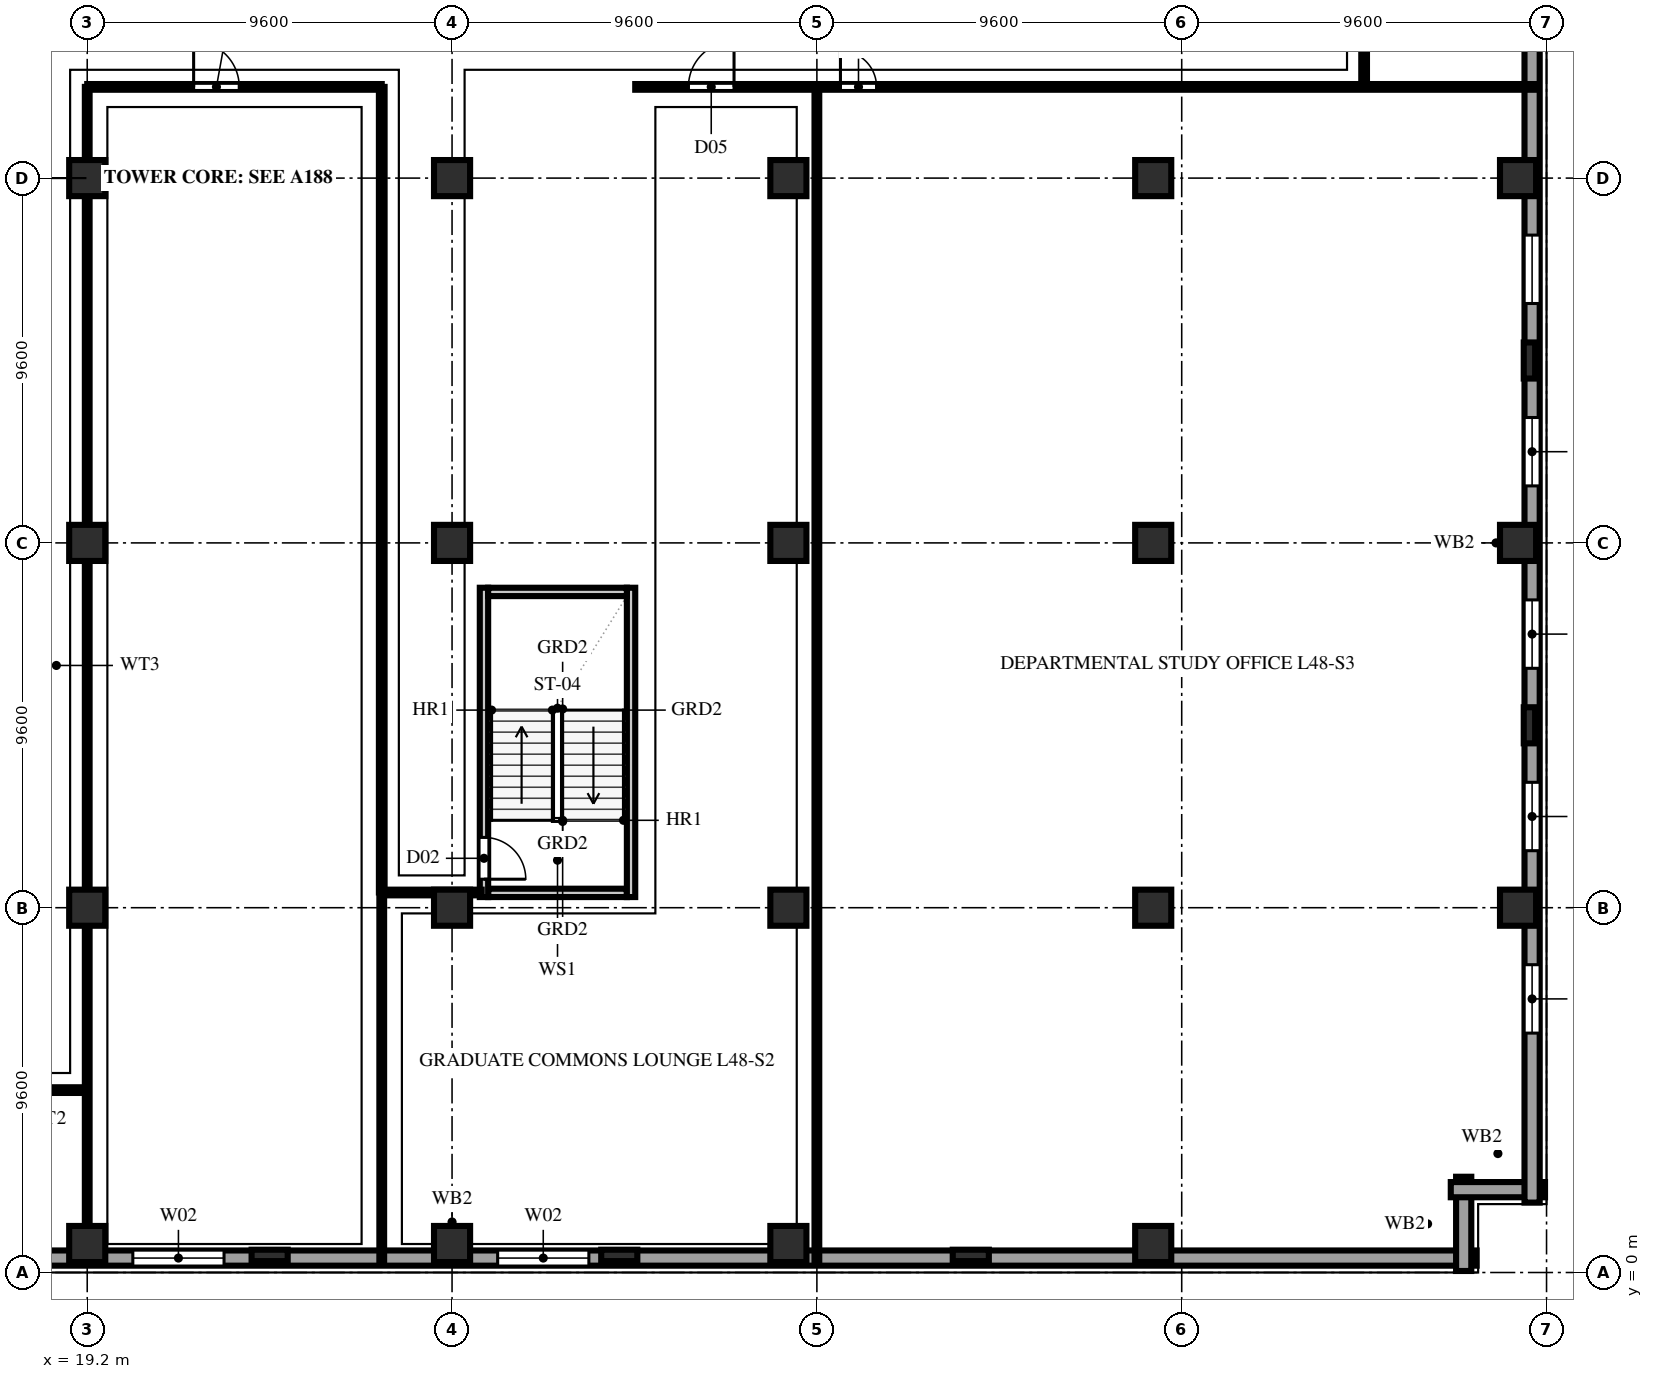
"""IFC4 building model, lengths in metres.
Left out: names, types, materials, properties, quantities, classifications, styles, units other than length and angle.
Written with IfcOpenShell. Run it as: python <this file> out.ifc"""

import sys

from ifc_helpers import new_model, si_unit, direction, frame, frame_2d, origin, origin_2d, place, context, subcontext, project, spatial, rectangle, extrude, element, fill, save


model = new_model("IFC4")
c1 = context("Model", 3, precision=1e-05, world=origin(), true_north=direction((0.0, 1.0)))
c2 = subcontext(c1, "Body", "Model", "MODEL_VIEW")
j1 = project(units=[si_unit("LENGTHUNIT", "METRE"), si_unit("PLANEANGLEUNIT", "RADIAN")], contexts=[c1])
p1 = place(None, origin())
s1 = spatial("IfcSite", under=j1, at=p1, CompositionType="ELEMENT")
p2 = place(p1, origin())
s2 = spatial("IfcBuilding", under=s1, at=p2, CompositionType="ELEMENT")
p3 = place(p2, frame((0.0, 0.0, 190.2)))
s3 = spatial("IfcBuildingStorey", under=s2, at=p3, CompositionType="ELEMENT", Elevation=190.2)
for number, where, z_axis, x_axis in (
    (1, (19.2, 0.75, 0.0), (0.0, 0.0, 1.0), (1.0, 0.0, 0.0)),
    (2, (19.2, 9.6, 0.0), (0.0, 0.0, 1.0), (1.0, 0.0, 0.0)),
    (3, (19.2, 19.2, 0.0), (0.0, 0.0, 1.0), (1.0, 0.0, 0.0)),
    (4, (19.2, 28.8, 0.0), (0.0, 0.0, 1.0), (1.0, 0.0, 0.0)),
    (5, (28.8, 0.75, 0.0), (0.0, 0.0, 1.0), (1.0, 0.0, 0.0)),
    (6, (28.8, 9.6, 0.0), (0.0, 0.0, 1.0), (1.0, 0.0, 0.0)),
    (7, (28.8, 19.2, 0.0), (0.0, 0.0, 1.0), (1.0, 0.0, 0.0)),
    (8, (28.8, 28.8, 0.0), (0.0, 0.0, 1.0), (1.0, 0.0, 0.0)),
    (9, (37.65, 0.75, 0.0), (0.0, 0.0, 1.0), (1.0, 0.0, 0.0)),
    (10, (37.65, 9.6, 0.0), (0.0, 0.0, 1.0), (1.0, 0.0, 0.0)),
    (11, (37.65, 19.2, 0.0), (0.0, 0.0, 1.0), (1.0, 0.0, 0.0)),
    (12, (37.65, 28.8, 0.0), (0.0, 0.0, 1.0), (1.0, 0.0, 0.0)),
    (13, (47.25, 0.75, 0.0), (0.0, 0.0, 1.0), (1.0, 0.0, 0.0)),
    (14, (47.25, 9.6, 0.0), (0.0, 0.0, 1.0), (1.0, 0.0, 0.0)),
    (15, (47.25, 19.2, 0.0), (0.0, 0.0, 1.0), (1.0, 0.0, 0.0)),
    (16, (47.25, 28.8, 0.0), (0.0, 0.0, 1.0), (1.0, 0.0, 0.0)),
    (17, (56.85, 9.6, 0.0), (0.0, 0.0, 1.0), (1.0, 0.0, 0.0)),
    (18, (56.85, 19.2, 0.0), (0.0, 0.0, 1.0), (1.0, 0.0, 0.0)),
    (19, (56.85, 28.8, 0.0), (0.0, 0.0, 1.0), (1.0, 0.0, 0.0)),
):
    element("IfcColumn", number, at=place(p3, frame(where, z_axis=z_axis, x_axis=x_axis)), inside=s3, PredefinedType="COLUMN", context=c2, shape_type="SweptSolid", body=[
        extrude(rectangle(XDim=0.95, YDim=0.95, at=origin_2d()), origin(), (0.0, 0.0, 1.0), 3.8),
    ])
for number, where, z_axis, x_axis in (
    (20, (24.0, 0.45, 0.0), (0.0, 0.0, 1.0), (1.0, 0.0, 0.0)),
    (21, (33.2, 0.45, 0.0), (0.0, 0.0, 1.0), (1.0, 0.0, 0.0)),
    (22, (42.45, 0.45, 0.0), (0.0, 0.0, 1.0), (1.0, 0.0, 0.0)),
    (23, (57.15, 14.4, 0.0), (0.0, 0.0, 1.0), (0.0, 1.0, 0.0)),
    (24, (57.15, 24.0, 0.0), (0.0, 0.0, 1.0), (0.0, 1.0, 0.0)),
):
    element("IfcColumn", number, at=place(p3, frame(where, z_axis=z_axis, x_axis=x_axis)), inside=s3, PredefinedType="PILASTER", context=c2, shape_type="SweptSolid", body=[
        extrude(rectangle(XDim=0.95, YDim=0.3, at=origin_2d()), origin(), (0.0, 0.0, 1.0), 3.8),
    ])
p4 = place(p3, frame((1.84, 0.38, 0.0), z_axis=(0.0, 0.0, 1.0), x_axis=(1.0, 0.0, 0.0)))
e25 = element("IfcWall", 25, at=p4, inside=s3, PredefinedType="SOLIDWALL", context=c2, shape_type="SweptSolid", body=[
    extrude(rectangle(XDim=53.92, YDim=0.4, at=frame_2d((26.96, 0.0))), origin(), (0.0, 0.0, 1.0), 3.48),
])
p5 = place(p4, frame((4.16, 0.0, 0.85)))
e26 = element("IfcOpeningElement", 26, at=p5, cuts=e25, PredefinedType="OPENING", context=c2, shape_type="SweptSolid", body=[
    extrude(rectangle(XDim=2.4, YDim=1.85, at=frame_2d((1.2, 0.925))), frame((0.0, 0.212, 0.0), z_axis=(0.0, -1.0, 0.0), x_axis=(1.0, 0.0, 0.0)), (0.0, 0.0, 1.0), 0.424),
])
p6 = place(p4, frame((8.96, 0.0, 0.85)))
e27 = element("IfcOpeningElement", 27, at=p6, cuts=e25, PredefinedType="OPENING", context=c2, shape_type="SweptSolid", body=[
    extrude(rectangle(XDim=2.4, YDim=1.85, at=frame_2d((1.2, 0.925))), frame((0.0, 0.212, 0.0), z_axis=(0.0, -1.0, 0.0), x_axis=(1.0, 0.0, 0.0)), (0.0, 0.0, 1.0), 0.424),
])
p7 = place(p4, frame((18.56, 0.0, 0.85)))
e28 = element("IfcOpeningElement", 28, at=p7, cuts=e25, PredefinedType="OPENING", context=c2, shape_type="SweptSolid", body=[
    extrude(rectangle(XDim=2.4, YDim=1.85, at=frame_2d((1.2, 0.925))), frame((0.0, 0.212, 0.0), z_axis=(0.0, -1.0, 0.0), x_axis=(1.0, 0.0, 0.0)), (0.0, 0.0, 1.0), 0.424),
])
p8 = place(p4, frame((28.16, 0.0, 0.85)))
e29 = element("IfcOpeningElement", 29, at=p8, cuts=e25, PredefinedType="OPENING", context=c2, shape_type="SweptSolid", body=[
    extrude(rectangle(XDim=2.4, YDim=1.85, at=frame_2d((1.2, 0.925))), frame((0.0, 0.212, 0.0), z_axis=(0.0, -1.0, 0.0), x_axis=(1.0, 0.0, 0.0)), (0.0, 0.0, 1.0), 0.424),
])
for number, where, z_axis, x_axis in (
    (30, (55.42, 0.04, 0.0), (0.0, 0.0, 1.0), (0.0, 1.0, 0.0)),
    (31, (55.08, 2.18, 0.0), (0.0, 0.0, 1.0), (1.0, 0.0, 0.0)),
):
    element("IfcWall", number, at=place(p3, frame(where, z_axis=z_axis, x_axis=x_axis)), inside=s3, PredefinedType="SOLIDWALL", context=c2, shape_type="SweptSolid", body=[
        extrude(rectangle(XDim=2.48, YDim=0.4, at=frame_2d((1.24, 0.0))), origin(), (0.0, 0.0, 1.0), 3.48),
    ])
p9 = place(p3, frame((57.22, 1.84, 0.0), z_axis=(0.0, 0.0, 1.0), x_axis=(0.0, 1.0, 0.0)))
e32 = element("IfcWall", 32, at=p9, inside=s3, PredefinedType="SOLIDWALL", context=c2, shape_type="SweptSolid", body=[
    extrude(rectangle(XDim=34.72, YDim=0.4, at=frame_2d((17.36, 0.0))), origin(), (0.0, 0.0, 1.0), 3.48),
])
p10 = place(p9, frame((4.46, 0.0, 0.85)))
e33 = element("IfcOpeningElement", 33, at=p10, cuts=e32, PredefinedType="OPENING", context=c2, shape_type="SweptSolid", body=[
    extrude(rectangle(XDim=1.8, YDim=1.85, at=frame_2d((0.9, 0.925))), frame((0.0, 0.212, 0.0), z_axis=(0.0, -1.0, 0.0), x_axis=(1.0, 0.0, 0.0)), (0.0, 0.0, 1.0), 0.424),
])
p11 = place(p9, frame((9.26, 0.0, 0.85)))
e34 = element("IfcOpeningElement", 34, at=p11, cuts=e32, PredefinedType="OPENING", context=c2, shape_type="SweptSolid", body=[
    extrude(rectangle(XDim=1.8, YDim=1.85, at=frame_2d((0.9, 0.925))), frame((0.0, 0.212, 0.0), z_axis=(0.0, -1.0, 0.0), x_axis=(1.0, 0.0, 0.0)), (0.0, 0.0, 1.0), 0.424),
])
p12 = place(p9, frame((14.06, 0.0, 0.85)))
e35 = element("IfcOpeningElement", 35, at=p12, cuts=e32, PredefinedType="OPENING", context=c2, shape_type="SweptSolid", body=[
    extrude(rectangle(XDim=1.8, YDim=1.85, at=frame_2d((0.9, 0.925))), frame((0.0, 0.212, 0.0), z_axis=(0.0, -1.0, 0.0), x_axis=(1.0, 0.0, 0.0)), (0.0, 0.0, 1.0), 0.424),
])
p13 = place(p9, frame((18.86, 0.0, 0.85)))
e36 = element("IfcOpeningElement", 36, at=p13, cuts=e32, PredefinedType="OPENING", context=c2, shape_type="SweptSolid", body=[
    extrude(rectangle(XDim=1.8, YDim=1.85, at=frame_2d((0.9, 0.925))), frame((0.0, 0.212, 0.0), z_axis=(0.0, -1.0, 0.0), x_axis=(1.0, 0.0, 0.0)), (0.0, 0.0, 1.0), 0.424),
])
p14 = place(p9, frame((23.66, 0.0, 0.85)))
e37 = element("IfcOpeningElement", 37, at=p14, cuts=e32, PredefinedType="OPENING", context=c2, shape_type="SweptSolid", body=[
    extrude(rectangle(XDim=1.8, YDim=1.85, at=frame_2d((0.9, 0.925))), frame((0.0, 0.212, 0.0), z_axis=(0.0, -1.0, 0.0), x_axis=(1.0, 0.0, 0.0)), (0.0, 0.0, 1.0), 0.424),
])
p15 = place(p3, frame((29.75, 9.99, 0.0), z_axis=(0.0, 0.0, 1.0), x_axis=(1.0, 0.0, 0.0)))
e38 = element("IfcWall", 38, at=p15, inside=s3, PredefinedType="SOLIDWALL", context=c2, shape_type="SweptSolid", body=[
    extrude(rectangle(XDim=3.65, YDim=0.22, at=frame_2d((1.825, 0.0))), origin(), (0.0, 0.0, 1.0), 3.48),
])
p16 = place(p3, frame((29.64, 9.88, 0.0), z_axis=(0.0, 0.0, 1.0), x_axis=(0.0, 1.0, 0.0)))
e39 = element("IfcWall", 39, at=p16, inside=s3, PredefinedType="SOLIDWALL", context=c2, shape_type="SweptSolid", body=[
    extrude(rectangle(XDim=8.14, YDim=0.22, at=frame_2d((4.07, 0.0))), origin(), (0.0, 0.0, 1.0), 3.48),
])
p17 = place(p16, frame((0.47, 0.0, 0.0)))
e40 = element("IfcOpeningElement", 40, at=p17, cuts=e39, PredefinedType="OPENING", context=c2, shape_type="SweptSolid", body=[
    extrude(rectangle(XDim=1.1, YDim=2.2, at=frame_2d((0.55, 1.1))), frame((0.0, 0.122, 0.0), z_axis=(0.0, -1.0, 0.0), x_axis=(1.0, 0.0, 0.0)), (0.0, 0.0, 1.0), 0.244),
])
p18 = place(p3, frame((33.51, 9.88, 0.0), z_axis=(0.0, 0.0, 1.0), x_axis=(0.0, 1.0, 0.0)))
e41 = element("IfcWall", 41, at=p18, inside=s3, PredefinedType="SOLIDWALL", context=c2, shape_type="SweptSolid", body=[
    extrude(rectangle(XDim=8.14, YDim=0.22, at=frame_2d((4.07, 0.0))), origin(), (0.0, 0.0, 1.0), 3.48),
])
p19 = place(p3, frame((29.75, 17.91, 0.0), z_axis=(0.0, 0.0, 1.0), x_axis=(1.0, 0.0, 0.0)))
e42 = element("IfcWall", 42, at=p19, inside=s3, PredefinedType="SOLIDWALL", context=c2, shape_type="SweptSolid", body=[
    extrude(rectangle(XDim=3.65, YDim=0.22, at=frame_2d((1.825, 0.0))), origin(), (0.0, 0.0, 1.0), 3.48),
])
p20 = place(p3, frame((17.05, 4.8, 0.0), z_axis=(0.0, 0.0, 1.0), x_axis=(1.0, 0.0, 0.0)))
e43 = element("IfcWall", 43, at=p20, inside=s3, PredefinedType="PARTITIONING", context=c2, shape_type="SweptSolid", body=[
    extrude(rectangle(XDim=2.15, YDim=0.15, at=frame_2d((1.075, 0.0))), origin(), (0.0, 0.0, 1.0), 3.48),
])
p21 = place(p3, frame((52.8, 31.2, 0.0), z_axis=(0.0, 0.0, 1.0), x_axis=(0.0, 1.0, 0.0)))
e44 = element("IfcWall", 44, at=p21, inside=s3, PredefinedType="PARTITIONING", context=c2, shape_type="SweptSolid", body=[
    extrude(rectangle(XDim=2.1, YDim=0.15, at=frame_2d((1.05, 0.0))), origin(), (0.0, 0.0, 1.0), 3.48),
])
p22 = place(p3, frame((19.2, 0.22, 0.0), z_axis=(0.0, 0.0, 1.0), x_axis=(0.0, 1.0, 0.0)))
e45 = element("IfcWall", 45, at=p22, inside=s3, PredefinedType="PARTITIONING", context=c2, shape_type="SweptSolid", body=[
    extrude(rectangle(XDim=0.53, YDim=0.125, at=frame_2d((0.265, 0.0))), origin(), (0.0, 0.0, 1.0), 3.48),
])
p23 = place(p3, frame((19.2, 0.75, 0.0), z_axis=(0.0, 0.0, 1.0), x_axis=(0.0, 1.0, 0.0)))
e46 = element("IfcWall", 46, at=p23, inside=s3, PredefinedType="PARTITIONING", context=c2, shape_type="SweptSolid", body=[
    extrude(rectangle(XDim=30.45, YDim=0.125, at=frame_2d((15.225, 0.0))), origin(), (0.0, 0.0, 1.0), 2.863),
])
p24 = place(p3, frame((19.2, 31.2, 0.0), z_axis=(0.0, 0.0, 1.0), x_axis=(1.0, 0.0, 0.0)))
e47 = element("IfcWall", 47, at=p24, inside=s3, PredefinedType="PARTITIONING", context=c2, shape_type="SweptSolid", body=[
    extrude(rectangle(XDim=7.75, YDim=0.15, at=frame_2d((3.875, 0.0))), origin(), (0.0, 0.0, 1.0), 3.48),
])
p25 = place(p24, frame((2.8, 0.0, 0.0)))
e48 = element("IfcOpeningElement", 48, at=p25, cuts=e47, PredefinedType="OPENING", context=c2, shape_type="SweptSolid", body=[
    extrude(rectangle(XDim=1.2, YDim=2.2, at=frame_2d((0.6, 1.1))), frame((0.0, 0.087, 0.0), z_axis=(0.0, -1.0, 0.0), x_axis=(1.0, 0.0, 0.0)), (0.0, 0.0, 1.0), 0.174),
])
p26 = place(p3, frame((26.95, 0.22, 0.0), z_axis=(0.0, 0.0, 1.0), x_axis=(0.0, 1.0, 0.0)))
e49 = element("IfcWall", 49, at=p26, inside=s3, PredefinedType="PARTITIONING", context=c2, shape_type="SweptSolid", body=[
    extrude(rectangle(XDim=9.78, YDim=0.125, at=frame_2d((4.89, 0.0))), origin(), (0.0, 0.0, 1.0), 3.48),
])
p27 = place(p3, frame((26.95, 10.0, 0.0), z_axis=(0.0, 0.0, 1.0), x_axis=(0.0, 1.0, 0.0)))
e50 = element("IfcWall", 50, at=p27, inside=s3, PredefinedType="PARTITIONING", context=c2, shape_type="SweptSolid", body=[
    extrude(rectangle(XDim=21.2, YDim=0.15, at=frame_2d((10.6, 0.0))), origin(), (0.0, 0.0, 1.0), 3.48),
])
p28 = place(p3, frame((26.95, 10.0, 0.0), z_axis=(0.0, 0.0, 1.0), x_axis=(1.0, 0.0, 0.0)))
e51 = element("IfcWall", 51, at=p28, inside=s3, PredefinedType="PARTITIONING", context=c2, shape_type="SweptSolid", body=[
    extrude(rectangle(XDim=2.63, YDim=0.15, at=frame_2d((1.315, 0.0))), origin(), (0.0, 0.0, 1.0), 3.48),
])
p29 = place(p3, frame((38.4, 0.22, 0.0), z_axis=(0.0, 0.0, 1.0), x_axis=(0.0, 1.0, 0.0)))
e52 = element("IfcWall", 52, at=p29, inside=s3, PredefinedType="PARTITIONING", context=c2, shape_type="SweptSolid", body=[
    extrude(rectangle(XDim=30.98, YDim=0.125, at=frame_2d((15.49, 0.0))), origin(), (0.0, 0.0, 1.0), 3.48),
])
p30 = place(p3, frame((33.62, 31.2, 0.0), z_axis=(0.0, 0.0, 1.0), x_axis=(1.0, 0.0, 0.0)))
e53 = element("IfcWall", 53, at=p30, inside=s3, PredefinedType="PARTITIONING", context=c2, shape_type="SweptSolid", body=[
    extrude(rectangle(XDim=23.76, YDim=0.15, at=frame_2d((11.88, 0.0))), origin(), (0.0, 0.0, 1.0), 3.48),
])
p31 = place(p30, frame((1.4, 0.0, 0.0)))
e54 = element("IfcOpeningElement", 54, at=p31, cuts=e53, PredefinedType="OPENING", context=c2, shape_type="SweptSolid", body=[
    extrude(rectangle(XDim=1.2, YDim=2.2, at=frame_2d((0.6, 1.1))), frame((0.0, 0.087, 0.0), z_axis=(0.0, -1.0, 0.0), x_axis=(1.0, 0.0, 0.0)), (0.0, 0.0, 1.0), 0.174),
])
p32 = place(p30, frame((5.4, 0.0, 0.0)))
e55 = element("IfcOpeningElement", 55, at=p32, cuts=e53, PredefinedType="OPENING", context=c2, shape_type="SweptSolid", body=[
    extrude(rectangle(XDim=0.95, YDim=2.15, at=frame_2d((0.475, 1.075))), frame((0.0, 0.087, 0.0), z_axis=(0.0, -1.0, 0.0), x_axis=(1.0, 0.0, 0.0)), (0.0, 0.0, 1.0), 0.174),
])
p33 = place(p7, origin())
e56 = element("IfcWindow", 56, at=p33, inside=s3, PartitioningType="TRIPLE_PANEL_VERTICAL", PredefinedType="WINDOW", context=c2, shape_type="SweptSolid", body=[
    extrude(rectangle(XDim=2.4, YDim=1.85, at=frame_2d((1.2, 0.925))), frame((0.0, 0.11, 0.0), z_axis=(0.0, -1.0, 0.0), x_axis=(1.0, 0.0, 0.0)), (0.0, 0.0, 1.0), 0.06),
])
fill(e28, e56)
p34 = place(p8, origin())
e57 = element("IfcWindow", 57, at=p34, inside=s3, PartitioningType="TRIPLE_PANEL_VERTICAL", PredefinedType="WINDOW", context=c2, shape_type="SweptSolid", body=[
    extrude(rectangle(XDim=2.4, YDim=1.85, at=frame_2d((1.2, 0.925))), frame((0.0, 0.11, 0.0), z_axis=(0.0, -1.0, 0.0), x_axis=(1.0, 0.0, 0.0)), (0.0, 0.0, 1.0), 0.06),
])
fill(e29, e57)
p35 = place(p10, origin())
e58 = element("IfcWindow", 58, at=p35, inside=s3, PartitioningType="DOUBLE_PANEL_VERTICAL", PredefinedType="WINDOW", context=c2, shape_type="SweptSolid", body=[
    extrude(rectangle(XDim=1.8, YDim=1.85, at=frame_2d((0.9, 0.925))), frame((0.0, 0.11, 0.0), z_axis=(0.0, -1.0, 0.0), x_axis=(1.0, 0.0, 0.0)), (0.0, 0.0, 1.0), 0.06),
])
fill(e33, e58)
p36 = place(p11, origin())
e59 = element("IfcWindow", 59, at=p36, inside=s3, PartitioningType="DOUBLE_PANEL_VERTICAL", PredefinedType="WINDOW", context=c2, shape_type="SweptSolid", body=[
    extrude(rectangle(XDim=1.8, YDim=1.85, at=frame_2d((0.9, 0.925))), frame((0.0, 0.11, 0.0), z_axis=(0.0, -1.0, 0.0), x_axis=(1.0, 0.0, 0.0)), (0.0, 0.0, 1.0), 0.06),
])
fill(e34, e59)
p37 = place(p12, origin())
e60 = element("IfcWindow", 60, at=p37, inside=s3, PartitioningType="DOUBLE_PANEL_VERTICAL", PredefinedType="WINDOW", context=c2, shape_type="SweptSolid", body=[
    extrude(rectangle(XDim=1.8, YDim=1.85, at=frame_2d((0.9, 0.925))), frame((0.0, 0.11, 0.0), z_axis=(0.0, -1.0, 0.0), x_axis=(1.0, 0.0, 0.0)), (0.0, 0.0, 1.0), 0.06),
])
fill(e35, e60)
p38 = place(p13, origin())
e61 = element("IfcWindow", 61, at=p38, inside=s3, PartitioningType="DOUBLE_PANEL_VERTICAL", PredefinedType="WINDOW", context=c2, shape_type="SweptSolid", body=[
    extrude(rectangle(XDim=1.8, YDim=1.85, at=frame_2d((0.9, 0.925))), frame((0.0, 0.11, 0.0), z_axis=(0.0, -1.0, 0.0), x_axis=(1.0, 0.0, 0.0)), (0.0, 0.0, 1.0), 0.06),
])
fill(e36, e61)
p39 = place(p14, origin())
e62 = element("IfcWindow", 62, at=p39, inside=s3, PartitioningType="DOUBLE_PANEL_VERTICAL", PredefinedType="WINDOW", context=c2, shape_type="SweptSolid", body=[
    extrude(rectangle(XDim=1.8, YDim=1.85, at=frame_2d((0.9, 0.925))), frame((0.0, 0.11, 0.0), z_axis=(0.0, -1.0, 0.0), x_axis=(1.0, 0.0, 0.0)), (0.0, 0.0, 1.0), 0.06),
])
fill(e37, e62)
p40 = place(p17, frame((1.1, 0.0, 0.0), z_axis=(0.0, 0.0, 1.0), x_axis=(-1.0, 0.0, 0.0)))
e63 = element("IfcDoor", 63, at=p40, inside=s3, OperationType="SINGLE_SWING_RIGHT", PredefinedType="DOOR", context=c2, shape_type="SweptSolid", body=[
    extrude(rectangle(XDim=1.1, YDim=2.2, at=frame_2d((0.55, 1.1))), frame((0.0, 0.025, 0.0), z_axis=(0.0, -1.0, 0.0), x_axis=(1.0, 0.0, 0.0)), (0.0, 0.0, 1.0), 0.05),
])
fill(e40, e63)
p41 = place(p25, origin())
e64 = element("IfcDoor", 64, at=p41, inside=s3, OperationType="SINGLE_SWING_LEFT", PredefinedType="DOOR", context=c2, shape_type="SweptSolid", body=[
    extrude(rectangle(XDim=1.2, YDim=2.2, at=frame_2d((0.6, 1.1))), frame((0.0, 0.025, 0.0), z_axis=(0.0, -1.0, 0.0), x_axis=(1.0, 0.0, 0.0)), (0.0, 0.0, 1.0), 0.05),
])
fill(e48, e64)
p42 = place(p31, origin())
e65 = element("IfcDoor", 65, at=p42, inside=s3, OperationType="SINGLE_SWING_RIGHT", PredefinedType="DOOR", context=c2, shape_type="SweptSolid", body=[
    extrude(rectangle(XDim=1.2, YDim=2.2, at=frame_2d((0.6, 1.1))), frame((0.0, 0.025, 0.0), z_axis=(0.0, -1.0, 0.0), x_axis=(1.0, 0.0, 0.0)), (0.0, 0.0, 1.0), 0.05),
])
fill(e54, e65)
p43 = place(p32, origin())
e66 = element("IfcDoor", 66, at=p43, inside=s3, OperationType="SINGLE_SWING_LEFT", PredefinedType="DOOR", context=c2, shape_type="SweptSolid", body=[
    extrude(rectangle(XDim=0.95, YDim=2.15, at=frame_2d((0.475, 1.075))), frame((0.0, 0.025, 0.0), z_axis=(0.0, -1.0, 0.0), x_axis=(1.0, 0.0, 0.0)), (0.0, 0.0, 1.0), 0.05),
])
fill(e55, e66)
save(model, sys.argv[1])
